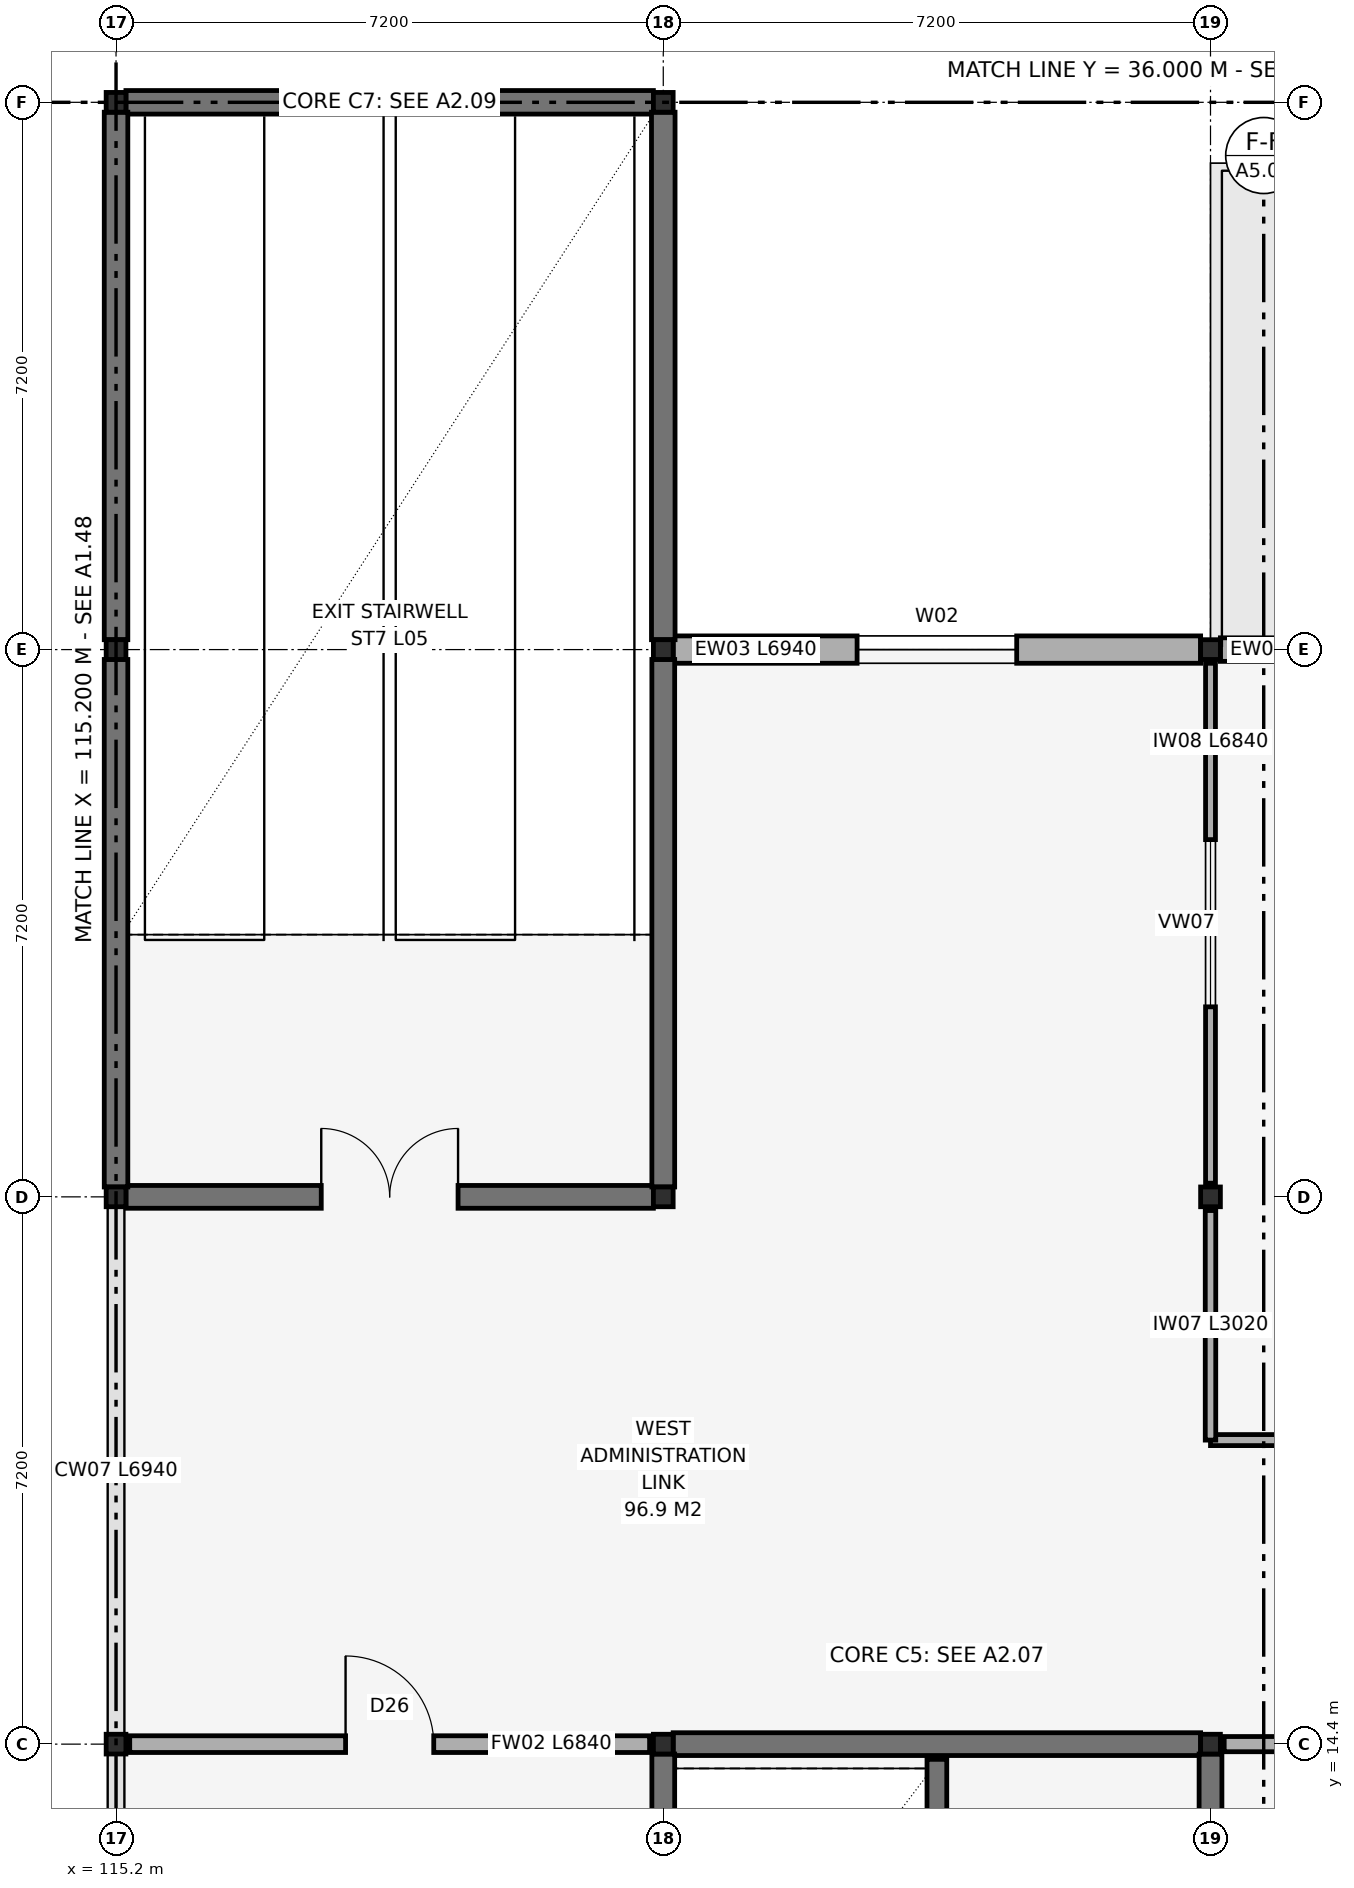
"""IFC4 building model, lengths in metres.
Left out: names, types, materials, properties, quantities, classifications, styles, units other than length and angle.
Written with IfcOpenShell. Run it as: python <this file> out.ifc"""

import sys

from ifc_helpers import new_model, si_unit, direction, frame, frame_2d, origin, origin_2d, place, context, subcontext, project, spatial, rectangle, hollow_rectangle, extrude, element, fill, save


model = new_model("IFC4")
c1 = context("Model", 3, precision=1e-05, world=origin(), true_north=direction((0.0, 1.0)))
c2 = subcontext(c1, "Body", "Model", "MODEL_VIEW")
j1 = project(units=[si_unit("LENGTHUNIT", "METRE"), si_unit("PLANEANGLEUNIT", "RADIAN")], contexts=[c1])
p1 = place(None, origin())
s1 = spatial("IfcSite", under=j1, at=p1, CompositionType="ELEMENT")
p2 = place(p1, origin())
s2 = spatial("IfcBuilding", under=s1, at=p2, CompositionType="ELEMENT")
p3 = place(p2, frame((0.0, 0.0, 23.4)))
s3 = spatial("IfcBuildingStorey", under=s2, at=p3, CompositionType="ELEMENT", Elevation=23.4)
for number, where, z_axis, x_axis in (
    (1, (115.2, 14.4, 0.0), (0.0, 0.0, 1.0), (1.0, 0.0, 0.0)),
    (2, (115.2, 21.6, 0.0), (0.0, 0.0, 1.0), (1.0, 0.0, 0.0)),
    (3, (115.2, 28.8, 0.0), (0.0, 0.0, 1.0), (1.0, 0.0, 0.0)),
    (4, (115.2, 36.0, 0.0), (0.0, 0.0, 1.0), (1.0, 0.0, 0.0)),
    (5, (122.4, 14.4, 0.0), (0.0, 0.0, 1.0), (1.0, 0.0, 0.0)),
    (6, (122.4, 21.6, 0.0), (0.0, 0.0, 1.0), (1.0, 0.0, 0.0)),
    (7, (122.4, 28.8, 0.0), (0.0, 0.0, 1.0), (1.0, 0.0, 0.0)),
    (8, (122.4, 36.0, 0.0), (0.0, 0.0, 1.0), (1.0, 0.0, 0.0)),
    (9, (129.6, 14.4, 0.0), (0.0, 0.0, 1.0), (1.0, 0.0, 0.0)),
    (10, (129.6, 21.6, 0.0), (0.0, 0.0, 1.0), (1.0, 0.0, 0.0)),
    (11, (129.6, 28.8, 0.0), (0.0, 0.0, 1.0), (1.0, 0.0, 0.0)),
):
    element("IfcColumn", number, at=place(p3, frame(where, z_axis=z_axis, x_axis=x_axis)), inside=s3, PredefinedType="COLUMN", context=c2, shape_type="SweptSolid", body=[
        extrude(hollow_rectangle(XDim=0.26, YDim=0.26, WallThickness=0.012, at=origin_2d()), origin(), (0.0, 0.0, 1.0), 4.2),
    ])
p4 = place(p3, frame((122.53, 28.8, 0.0), z_axis=(0.0, 0.0, 1.0), x_axis=(1.0, 0.0, 0.0)))
e12 = element("IfcWall", 12, at=p4, inside=s3, PredefinedType="SOLIDWALL", context=c2, shape_type="SweptSolid", body=[
    extrude(rectangle(XDim=6.94, YDim=0.36, at=frame_2d((3.47, 0.0))), origin(), (0.0, 0.0, 1.0), 3.98),
])
p5 = place(p4, frame((2.42, 0.0, 0.95)))
e13 = element("IfcOpeningElement", 13, at=p5, cuts=e12, PredefinedType="OPENING", context=c2, shape_type="SweptSolid", body=[
    extrude(rectangle(XDim=2.1, YDim=2.65, at=frame_2d((1.05, 1.325))), frame((0.0, 0.195, 0.0), z_axis=(0.0, -1.0, 0.0), x_axis=(1.0, 0.0, 0.0)), (0.0, 0.0, 1.0), 0.39),
])
p6 = place(p3, frame((129.73, 28.8, 0.0), z_axis=(0.0, 0.0, 1.0), x_axis=(1.0, 0.0, 0.0)))
e14 = element("IfcWall", 14, at=p6, inside=s3, PredefinedType="SOLIDWALL", context=c2, shape_type="SweptSolid", body=[
    extrude(rectangle(XDim=6.94, YDim=0.31, at=frame_2d((3.47, 0.0))), origin(), (0.0, 0.0, 1.0), 3.98),
])
p7 = place(p6, frame((2.27, 0.0, 0.95)))
e15 = element("IfcOpeningElement", 15, at=p7, cuts=e14, PredefinedType="OPENING", context=c2, shape_type="SweptSolid", body=[
    extrude(rectangle(XDim=2.4, YDim=2.0, at=frame_2d((1.2, 1.0))), frame((0.0, 0.17, 0.0), z_axis=(0.0, -1.0, 0.0), x_axis=(1.0, 0.0, 0.0)), (0.0, 0.0, 1.0), 0.34),
])
for number, where, z_axis, x_axis in (
    (16, (122.53, 14.4, 0.0), (0.0, 0.0, 1.0), (1.0, 0.0, 0.0)),
    (17, (122.4, 7.33, 0.0), (0.0, 0.0, 1.0), (0.0, 1.0, 0.0)),
):
    element("IfcWall", number, at=place(p3, frame(where, z_axis=z_axis, x_axis=x_axis)), inside=s3, PredefinedType="SHEAR", context=c2, shape_type="SweptSolid", body=[
        extrude(rectangle(XDim=6.94, YDim=0.3, at=frame_2d((3.47, 0.0))), origin(), (0.0, 0.0, 1.0), 4.0),
    ])
p8 = place(p3, frame((129.6, 7.33, 0.0), z_axis=(0.0, 0.0, 1.0), x_axis=(0.0, 1.0, 0.0)))
e18 = element("IfcWall", 18, at=p8, inside=s3, PredefinedType="SHEAR", context=c2, shape_type="SweptSolid", body=[
    extrude(rectangle(XDim=6.94, YDim=0.3, at=frame_2d((3.47, 0.0))), origin(), (0.0, 0.0, 1.0), 4.0),
])
p9 = place(p8, frame((2.67, 0.0, 0.0)))
e19 = element("IfcOpeningElement", 19, at=p9, cuts=e18, PredefinedType="OPENING", context=c2, shape_type="SweptSolid", body=[
    extrude(rectangle(XDim=1.6, YDim=2.2, at=frame_2d((0.8, 1.1))), frame((0.0, 0.165, 0.0), z_axis=(0.0, -1.0, 0.0), x_axis=(1.0, 0.0, 0.0)), (0.0, 0.0, 1.0), 0.33),
])
p10 = place(p3, frame((126.0, 0.2, 0.0), z_axis=(0.0, 0.0, 1.0), x_axis=(0.0, 1.0, 0.0)))
e20 = element("IfcWall", 20, at=p10, inside=s3, PredefinedType="SHEAR", context=c2, shape_type="SweptSolid", body=[
    extrude(rectangle(XDim=14.0, YDim=0.26, at=frame_2d((7.0, 0.0))), origin(), (0.0, 0.0, 1.0), 4.0),
])
p11 = place(p10, frame((1.65, 0.0, 0.0)))
e21 = element("IfcOpeningElement", 21, at=p11, cuts=e20, PredefinedType="OPENING", context=c2, shape_type="SweptSolid", body=[
    extrude(rectangle(XDim=1.1, YDim=2.15, at=frame_2d((0.55, 1.075))), frame((0.0, 0.145, 0.0), z_axis=(0.0, -1.0, 0.0), x_axis=(1.0, 0.0, 0.0)), (0.0, 0.0, 1.0), 0.29),
])
p12 = place(p10, frame((10.6, 0.0, 0.0)))
e22 = element("IfcOpeningElement", 22, at=p12, cuts=e20, PredefinedType="OPENING", context=c2, shape_type="SweptSolid", body=[
    extrude(rectangle(XDim=1.2, YDim=2.25, at=frame_2d((0.6, 1.125))), frame((0.0, 0.145, 0.0), z_axis=(0.0, -1.0, 0.0), x_axis=(1.0, 0.0, 0.0)), (0.0, 0.0, 1.0), 0.29),
])
p13 = place(p3, frame((115.33, 21.6, 0.0), z_axis=(0.0, 0.0, 1.0), x_axis=(1.0, 0.0, 0.0)))
e23 = element("IfcWall", 23, at=p13, inside=s3, PredefinedType="SHEAR", context=c2, shape_type="SweptSolid", body=[
    extrude(rectangle(XDim=6.94, YDim=0.3, at=frame_2d((3.47, 0.0))), origin(), (0.0, 0.0, 1.0), 4.0),
])
p14 = place(p13, frame((2.57, 0.0, 0.0)))
e24 = element("IfcOpeningElement", 24, at=p14, cuts=e23, PredefinedType="OPENING", context=c2, shape_type="SweptSolid", body=[
    extrude(rectangle(XDim=1.8, YDim=2.2, at=frame_2d((0.9, 1.1))), frame((0.0, 0.165, 0.0), z_axis=(0.0, -1.0, 0.0), x_axis=(1.0, 0.0, 0.0)), (0.0, 0.0, 1.0), 0.33),
])
for number, where, z_axis, x_axis in (
    (25, (115.33, 36.0, 0.0), (0.0, 0.0, 1.0), (1.0, 0.0, 0.0)),
    (26, (115.2, 21.73, 0.0), (0.0, 0.0, 1.0), (0.0, 1.0, 0.0)),
):
    element("IfcWall", number, at=place(p3, frame(where, z_axis=z_axis, x_axis=x_axis)), inside=s3, PredefinedType="SHEAR", context=c2, shape_type="SweptSolid", body=[
        extrude(rectangle(XDim=6.94, YDim=0.31, at=frame_2d((3.47, 0.0))), origin(), (0.0, 0.0, 1.0), 4.0),
    ])
p15 = place(p3, frame((115.2, 28.93, 0.0), z_axis=(0.0, 0.0, 1.0), x_axis=(0.0, 1.0, 0.0)))
e27 = element("IfcWall", 27, at=p15, inside=s3, PredefinedType="SHEAR", context=c2, shape_type="SweptSolid", body=[
    extrude(rectangle(XDim=6.94, YDim=0.31, at=frame_2d((3.47, 0.0))), origin(), (0.0, 0.0, 1.0), 4.0),
])
p16 = place(p3, frame((122.4, 21.73, 0.0), z_axis=(0.0, 0.0, 1.0), x_axis=(0.0, 1.0, 0.0)))
e28 = element("IfcWall", 28, at=p16, inside=s3, PredefinedType="SHEAR", context=c2, shape_type="SweptSolid", body=[
    extrude(rectangle(XDim=6.94, YDim=0.3, at=frame_2d((3.47, 0.0))), origin(), (0.0, 0.0, 1.0), 4.0),
])
p17 = place(p3, frame((122.4, 28.93, 0.0), z_axis=(0.0, 0.0, 1.0), x_axis=(0.0, 1.0, 0.0)))
e29 = element("IfcWall", 29, at=p17, inside=s3, PredefinedType="SHEAR", context=c2, shape_type="SweptSolid", body=[
    extrude(rectangle(XDim=6.94, YDim=0.31, at=frame_2d((3.47, 0.0))), origin(), (0.0, 0.0, 1.0), 4.0),
])
p18 = place(p3, frame((115.38, 14.4, 0.0), z_axis=(0.0, 0.0, 1.0), x_axis=(1.0, 0.0, 0.0)))
e30 = element("IfcWall", 30, at=p18, inside=s3, PredefinedType="SOLIDWALL", context=c2, shape_type="SweptSolid", body=[
    extrude(rectangle(XDim=6.84, YDim=0.22, at=frame_2d((3.42, 0.0))), origin(), (0.0, 0.0, 1.0), 3.98),
])
p19 = place(p18, frame((2.84, 0.0, 0.0)))
e31 = element("IfcOpeningElement", 31, at=p19, cuts=e30, PredefinedType="OPENING", context=c2, shape_type="SweptSolid", body=[
    extrude(rectangle(XDim=1.16, YDim=2.2, at=frame_2d((0.58, 1.1))), frame((0.0, 0.125, 0.0), z_axis=(0.0, -1.0, 0.0), x_axis=(1.0, 0.0, 0.0)), (0.0, 0.0, 1.0), 0.25),
])
p20 = place(p3, frame((129.78, 14.4, 0.0), z_axis=(0.0, 0.0, 1.0), x_axis=(1.0, 0.0, 0.0)))
e32 = element("IfcWall", 32, at=p20, inside=s3, PredefinedType="SOLIDWALL", context=c2, shape_type="SweptSolid", body=[
    extrude(rectangle(XDim=6.84, YDim=0.2, at=frame_2d((3.42, 0.0))), origin(), (0.0, 0.0, 1.0), 3.98),
])
p21 = place(p20, frame((2.93, 0.0, 0.0)))
e33 = element("IfcOpeningElement", 33, at=p21, cuts=e32, PredefinedType="OPENING", context=c2, shape_type="SweptSolid", body=[
    extrude(rectangle(XDim=0.98, YDim=2.15, at=frame_2d((0.49, 1.075))), frame((0.0, 0.115, 0.0), z_axis=(0.0, -1.0, 0.0), x_axis=(1.0, 0.0, 0.0)), (0.0, 0.0, 1.0), 0.23),
])
p22 = place(p3, frame((129.6, 18.4, 0.0), z_axis=(0.0, 0.0, 1.0), x_axis=(1.0, 0.0, 0.0)))
e34 = element("IfcWall", 34, at=p22, inside=s3, PredefinedType="PARTITIONING", context=c2, shape_type="SweptSolid", body=[
    extrude(rectangle(XDim=14.4, YDim=0.145, at=frame_2d((7.2, 0.0))), origin(), (0.0, 0.0, 1.0), 3.98),
])
p23 = place(p22, frame((3.13, 0.0, 0.0)))
e35 = element("IfcOpeningElement", 35, at=p23, cuts=e34, PredefinedType="OPENING", context=c2, shape_type="SweptSolid", body=[
    extrude(rectangle(XDim=0.94, YDim=2.15, at=frame_2d((0.47, 1.075))), frame((0.0, 0.087, 0.0), z_axis=(0.0, -1.0, 0.0), x_axis=(1.0, 0.0, 0.0)), (0.0, 0.0, 1.0), 0.175),
])
p24 = place(p3, frame((129.6, 18.4, 0.0), z_axis=(0.0, 0.0, 1.0), x_axis=(0.0, 1.0, 0.0)))
e36 = element("IfcWall", 36, at=p24, inside=s3, PredefinedType="PARTITIONING", context=c2, shape_type="SweptSolid", body=[
    extrude(rectangle(XDim=3.02, YDim=0.138, at=frame_2d((1.51, 0.0))), origin(), (0.0, 0.0, 1.0), 3.98),
])
p25 = place(p3, frame((129.6, 21.78, 0.0), z_axis=(0.0, 0.0, 1.0), x_axis=(0.0, 1.0, 0.0)))
e37 = element("IfcWall", 37, at=p25, inside=s3, PredefinedType="PARTITIONING", context=c2, shape_type="SweptSolid", body=[
    extrude(rectangle(XDim=6.84, YDim=0.13, at=frame_2d((3.42, 0.0))), origin(), (0.0, 0.0, 1.0), 3.98),
])
p26 = place(p25, frame((2.32, 0.0, 0.95)))
e38 = element("IfcOpeningElement", 38, at=p26, cuts=e37, PredefinedType="OPENING", context=c2, shape_type="SweptSolid", body=[
    extrude(rectangle(XDim=2.2, YDim=1.35, at=frame_2d((1.1, 0.675))), frame((0.0, 0.08, 0.0), z_axis=(0.0, -1.0, 0.0), x_axis=(1.0, 0.0, 0.0)), (0.0, 0.0, 1.0), 0.16),
])
p27 = place(p5, origin())
e39 = element("IfcWindow", 39, at=p27, inside=s3, PartitioningType="SINGLE_PANEL", PredefinedType="WINDOW", context=c2, shape_type="SweptSolid", body=[
    extrude(rectangle(XDim=2.1, YDim=2.65, at=frame_2d((1.05, 1.325))), frame((0.0, 0.03, 0.0), z_axis=(0.0, -1.0, 0.0), x_axis=(1.0, 0.0, 0.0)), (0.0, 0.0, 1.0), 0.06),
])
fill(e13, e39)
p28 = place(p14, origin())
e40 = element("IfcDoor", 40, at=p28, inside=s3, OperationType="DOUBLE_SWING_LEFT", PredefinedType="DOOR", context=c2, shape_type="SweptSolid", body=[
    extrude(rectangle(XDim=1.8, YDim=2.2, at=frame_2d((0.9, 1.1))), frame((0.0, 0.025, 0.0), z_axis=(0.0, -1.0, 0.0), x_axis=(1.0, 0.0, 0.0)), (0.0, 0.0, 1.0), 0.05),
])
fill(e24, e40)
p29 = place(p19, frame((1.16, 0.0, 0.0), z_axis=(0.0, 0.0, 1.0), x_axis=(-1.0, 0.0, 0.0)))
e41 = element("IfcDoor", 41, at=p29, inside=s3, OperationType="SINGLE_SWING_RIGHT", PredefinedType="DOOR", context=c2, shape_type="SweptSolid", body=[
    extrude(rectangle(XDim=1.16, YDim=2.2, at=frame_2d((0.58, 1.1))), frame((0.0, 0.025, 0.0), z_axis=(0.0, -1.0, 0.0), x_axis=(1.0, 0.0, 0.0)), (0.0, 0.0, 1.0), 0.05),
])
fill(e31, e41)
p30 = place(p26, origin())
e42 = element("IfcWindow", 42, at=p30, inside=s3, PartitioningType="SINGLE_PANEL", PredefinedType="WINDOW", context=c2, shape_type="SweptSolid", body=[
    extrude(rectangle(XDim=2.2, YDim=1.35, at=frame_2d((1.1, 0.675))), frame((0.0, 0.03, 0.0), z_axis=(0.0, -1.0, 0.0), x_axis=(1.0, 0.0, 0.0)), (0.0, 0.0, 1.0), 0.06),
])
fill(e38, e42)
save(model, sys.argv[1])
